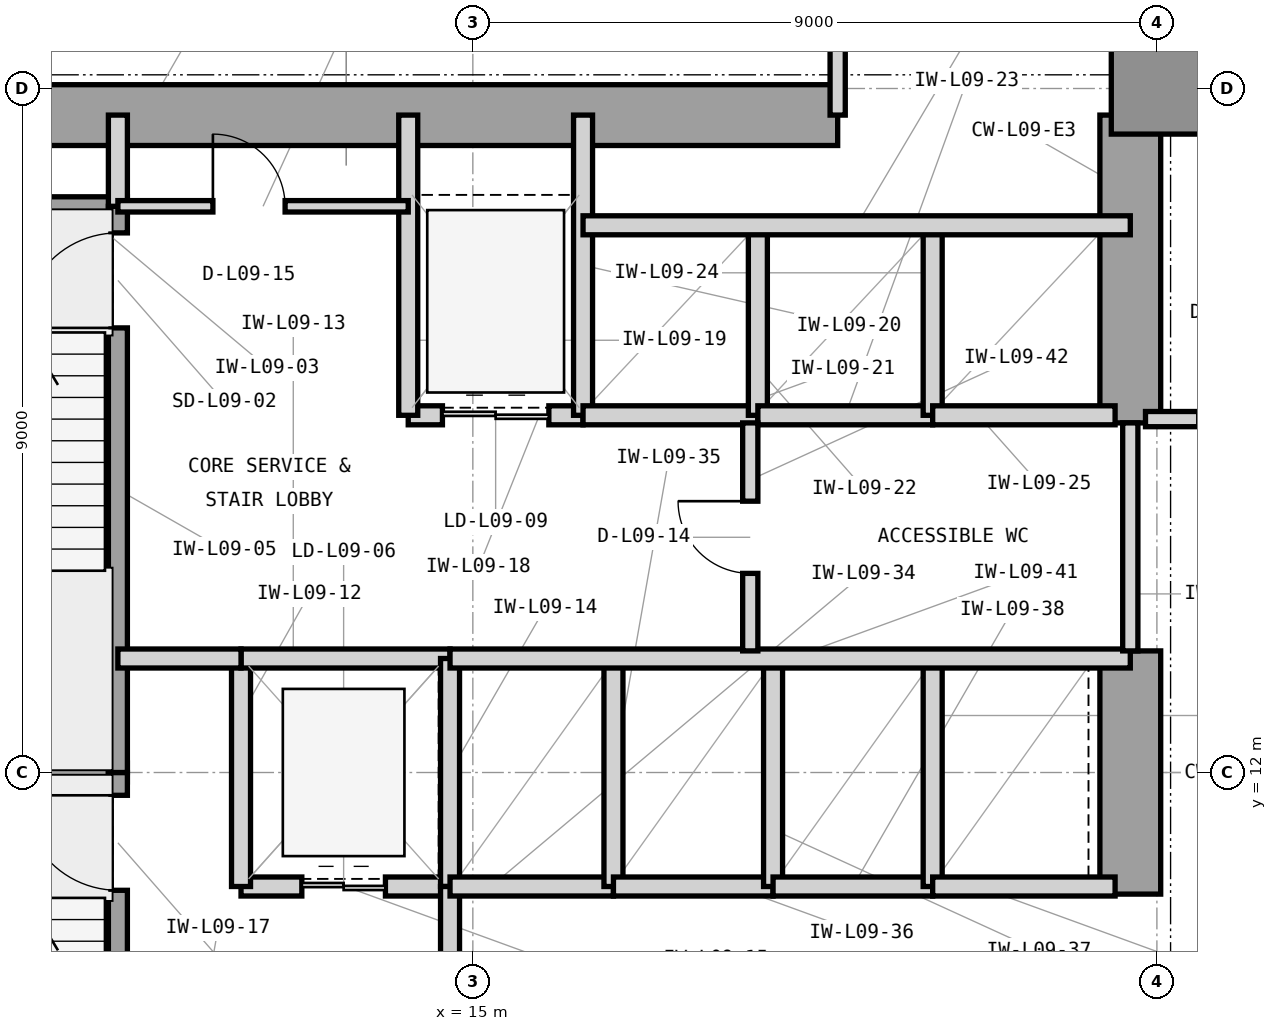
"""IFC4 building model, lengths in metres.
Left out: names, types, materials, properties, quantities, classifications, styles, units other than length and angle.
Written with IfcOpenShell. Run it as: python <this file> out.ifc"""

import sys

from ifc_helpers import new_model, si_unit, direction, frame, frame_2d, origin, origin_2d, place, context, subcontext, project, spatial, rectangle, extrude, element, fill, save


model = new_model("IFC4")
c1 = context("Model", 3, precision=1e-05, world=origin(), true_north=direction((0.0, 1.0)))
c2 = subcontext(c1, "Body", "Model", "MODEL_VIEW")
j1 = project(units=[si_unit("LENGTHUNIT", "METRE"), si_unit("PLANEANGLEUNIT", "RADIAN")], contexts=[c1])
p1 = place(None, origin())
s1 = spatial("IfcSite", under=j1, at=p1, CompositionType="ELEMENT")
p2 = place(p1, origin())
s2 = spatial("IfcBuilding", under=s1, at=p2, CompositionType="ELEMENT")
p3 = place(p2, frame((0.0, 0.0, 42.6)))
s3 = spatial("IfcBuildingStorey", under=s2, at=p3, CompositionType="ELEMENT", Elevation=42.6)
p4 = place(p3, frame((7.475, 20.65, 0.0), z_axis=(0.0, 0.0, 1.0), x_axis=(1.0, 0.0, 0.0)))
e1 = element("IfcWall", 1, at=p4, inside=s3, PredefinedType="SHEAR", context=c2, shape_type="SweptSolid", body=[
    extrude(rectangle(XDim=12.325, YDim=0.8, at=frame_2d((6.163, 0.0))), origin(), (0.0, 0.0, 1.0), 4.2),
])
p5 = place(p3, frame((23.65, 10.4, 0.0), z_axis=(0.0, 0.0, 1.0), x_axis=(0.0, 1.0, 0.0)))
e2 = element("IfcWall", 2, at=p5, inside=s3, PredefinedType="SHEAR", context=c2, shape_type="SweptSolid", body=[
    extrude(rectangle(XDim=3.2, YDim=0.8, at=frame_2d((1.6, 0.0))), origin(), (0.0, 0.0, 1.0), 4.2),
])
p6 = place(p3, frame((23.65, 16.6, 0.0), z_axis=(0.0, 0.0, 1.0), x_axis=(0.0, 1.0, 0.0)))
e3 = element("IfcWall", 3, at=p6, inside=s3, PredefinedType="SHEAR", context=c2, shape_type="SweptSolid", body=[
    extrude(rectangle(XDim=4.05, YDim=0.8, at=frame_2d((2.025, 0.0))), origin(), (0.0, 0.0, 1.0), 4.2),
])
p7 = place(p3, frame((24.0, 21.0, 0.0), z_axis=(0.0, 0.0, 1.0), x_axis=(1.0, 0.0, 0.0)))
e4 = element("IfcColumn", 4, at=p7, inside=s3, PredefinedType="COLUMN", context=c2, shape_type="SweptSolid", body=[
    extrude(rectangle(XDim=1.2, YDim=1.2, at=origin_2d()), origin(), (0.0, 0.0, 1.0), 4.2),
])
p8 = place(p3, frame((64.4, 20.79, 0.0), z_axis=(0.0, 0.0, 1.0), x_axis=(-1.0, 0.0, 0.0)))
e5 = element("IfcWall", 5, at=p8, inside=s3, PredefinedType="STANDARD", context=c2, shape_type="SweptSolid", body=[
    extrude(rectangle(XDim=40.4, YDim=0.42, at=frame_2d((20.2, 0.0))), origin(), (0.0, 0.0, 1.0), 3.98),
])
p9 = place(p8, frame((26.375, 0.0, 0.85)))
e6 = element("IfcOpeningElement", 6, at=p9, cuts=e5, PredefinedType="OPENING", context=c2, shape_type="SweptSolid", body=[
    extrude(rectangle(XDim=2.8, YDim=2.45, at=frame_2d((1.4, 1.225))), frame((0.0, 0.22, 0.0), z_axis=(0.0, -1.0, 0.0), x_axis=(1.0, 0.0, 0.0)), (0.0, 0.0, 1.0), 0.44),
])
p10 = place(p8, frame((38.222, 0.0, 0.85)))
e7 = element("IfcOpeningElement", 7, at=p10, cuts=e5, PredefinedType="OPENING", context=c2, shape_type="SweptSolid", body=[
    extrude(rectangle(XDim=1.2, YDim=2.45, at=frame_2d((0.6, 1.225))), frame((0.0, 0.22, 0.0), z_axis=(0.0, -1.0, 0.0), x_axis=(1.0, 0.0, 0.0)), (0.0, 0.0, 1.0), 0.44),
])
p11 = place(p8, frame((32.536, 0.0, 0.85)))
e8 = element("IfcOpeningElement", 8, at=p11, cuts=e5, PredefinedType="OPENING", context=c2, shape_type="SweptSolid", body=[
    extrude(rectangle(XDim=2.8, YDim=2.45, at=frame_2d((1.4, 1.225))), frame((0.0, 0.22, 0.0), z_axis=(0.0, -1.0, 0.0), x_axis=(1.0, 0.0, 0.0)), (0.0, 0.0, 1.0), 0.44),
])
p12 = place(p8, frame((17.386, 0.0, 0.85)))
e9 = element("IfcOpeningElement", 9, at=p12, cuts=e5, PredefinedType="OPENING", context=c2, shape_type="SweptSolid", body=[
    extrude(rectangle(XDim=2.8, YDim=2.45, at=frame_2d((1.4, 1.225))), frame((0.0, 0.22, 0.0), z_axis=(0.0, -1.0, 0.0), x_axis=(1.0, 0.0, 0.0)), (0.0, 0.0, 1.0), 0.44),
])
p13 = place(p3, frame((23.79, 21.0, 0.0), z_axis=(0.0, 0.0, 1.0), x_axis=(0.0, 1.0, 0.0)))
e10 = element("IfcWall", 10, at=p13, inside=s3, PredefinedType="STANDARD", context=c2, shape_type="SweptSolid", body=[
    extrude(rectangle(XDim=28.4, YDim=0.42, at=frame_2d((14.2, 0.0))), origin(), (0.0, 0.0, 1.0), 3.98),
])
p14 = place(p13, frame((10.433, 0.0, 0.85)))
e11 = element("IfcOpeningElement", 11, at=p14, cuts=e10, PredefinedType="OPENING", context=c2, shape_type="SweptSolid", body=[
    extrude(rectangle(XDim=2.8, YDim=2.45, at=frame_2d((1.4, 1.225))), frame((0.0, 0.22, 0.0), z_axis=(0.0, -1.0, 0.0), x_axis=(1.0, 0.0, 0.0)), (0.0, 0.0, 1.0), 0.44),
])
p15 = place(p13, frame((16.016, 0.0, 0.85)))
e12 = element("IfcOpeningElement", 12, at=p15, cuts=e10, PredefinedType="OPENING", context=c2, shape_type="SweptSolid", body=[
    extrude(rectangle(XDim=1.2, YDim=2.45, at=frame_2d((0.6, 1.225))), frame((0.0, 0.22, 0.0), z_axis=(0.0, -1.0, 0.0), x_axis=(1.0, 0.0, 0.0)), (0.0, 0.0, 1.0), 0.44),
])
p16 = place(p3, frame((6.35, 12.0, 0.0), z_axis=(0.0, 0.0, 1.0), x_axis=(1.0, 0.0, 0.0)))
e13 = element("IfcWall", 13, at=p16, inside=s3, PredefinedType="SHEAR", context=c2, shape_type="SweptSolid", body=[
    extrude(rectangle(XDim=4.105, YDim=0.25, at=frame_2d((2.052, 0.0))), origin(), (0.0, 0.0, 1.0), 4.2),
])
p17 = place(p3, frame((7.7, 19.45, 0.0), z_axis=(0.0, 0.0, 1.0), x_axis=(1.0, 0.0, 0.0)))
e14 = element("IfcWall", 14, at=p17, inside=s3, PredefinedType="SHEAR", context=c2, shape_type="SweptSolid", body=[
    extrude(rectangle(XDim=2.755, YDim=0.25, at=frame_2d((1.377, 0.0))), origin(), (0.0, 0.0, 1.0), 4.2),
])
p18 = place(p3, frame((10.33, 4.55, 0.0), z_axis=(0.0, 0.0, 1.0), x_axis=(0.0, 1.0, 0.0)))
e15 = element("IfcWall", 15, at=p18, inside=s3, PredefinedType="SHEAR", context=c2, shape_type="SweptSolid", body=[
    extrude(rectangle(XDim=7.45, YDim=0.25, at=frame_2d((3.725, 0.0))), origin(), (0.0, 0.0, 1.0), 4.2),
])
p19 = place(p18, frame((5.9, 0.0, 0.0)))
e16 = element("IfcOpeningElement", 16, at=p19, cuts=e15, PredefinedType="OPENING", context=c2, shape_type="SweptSolid", body=[
    extrude(rectangle(XDim=1.25, YDim=2.2, at=frame_2d((0.625, 1.1))), frame((0.0, 0.135, 0.0), z_axis=(0.0, -1.0, 0.0), x_axis=(1.0, 0.0, 0.0)), (0.0, 0.0, 1.0), 0.27),
])
p20 = place(p3, frame((10.33, 12.0, 0.0), z_axis=(0.0, 0.0, 1.0), x_axis=(0.0, 1.0, 0.0)))
e17 = element("IfcWall", 17, at=p20, inside=s3, PredefinedType="SHEAR", context=c2, shape_type="SweptSolid", body=[
    extrude(rectangle(XDim=7.45, YDim=0.25, at=frame_2d((3.725, 0.0))), origin(), (0.0, 0.0, 1.0), 4.2),
])
p21 = place(p20, frame((5.85, 0.0, 0.0)))
e18 = element("IfcOpeningElement", 18, at=p21, cuts=e17, PredefinedType="OPENING", context=c2, shape_type="SweptSolid", body=[
    extrude(rectangle(XDim=1.25, YDim=2.2, at=frame_2d((0.625, 1.1))), frame((0.0, 0.135, 0.0), z_axis=(0.0, -1.0, 0.0), x_axis=(1.0, 0.0, 0.0)), (0.0, 0.0, 1.0), 0.27),
])
p22 = place(p3, frame((10.33, 19.45, 0.0), z_axis=(0.0, 0.0, 1.0), x_axis=(0.0, 1.0, 0.0)))
e19 = element("IfcWall", 19, at=p22, inside=s3, PredefinedType="PARTITIONING", context=c2, shape_type="SweptSolid", body=[
    extrude(rectangle(XDim=1.2, YDim=0.25, at=frame_2d((0.6, 0.0))), origin(), (0.0, 0.0, 1.0), 3.114),
])
p23 = place(p3, frame((11.95, 10.5, 0.0), z_axis=(0.0, 0.0, 1.0), x_axis=(1.0, 0.0, 0.0)))
e20 = element("IfcWall", 20, at=p23, inside=s3, PredefinedType="PARTITIONING", context=c2, shape_type="SweptSolid", body=[
    extrude(rectangle(XDim=2.75, YDim=0.25, at=frame_2d((1.375, 0.0))), origin(), (0.0, 0.0, 1.0), 3.426),
])
p24 = place(p23, frame((0.8, 0.0, 0.0)))
e21 = element("IfcOpeningElement", 21, at=p24, cuts=e20, PredefinedType="OPENING", context=c2, shape_type="SweptSolid", body=[
    extrude(rectangle(XDim=1.1, YDim=2.25, at=frame_2d((0.55, 1.125))), frame((0.0, 0.135, 0.0), z_axis=(0.0, -1.0, 0.0), x_axis=(1.0, 0.0, 0.0)), (0.0, 0.0, 1.0), 0.27),
])
p25 = place(p3, frame((11.95, 10.5, 0.0), z_axis=(0.0, 0.0, 1.0), x_axis=(0.0, 1.0, 0.0)))
e22 = element("IfcWall", 22, at=p25, inside=s3, PredefinedType="PARTITIONING", context=c2, shape_type="SweptSolid", body=[
    extrude(rectangle(XDim=3.0, YDim=0.25, at=frame_2d((1.5, 0.0))), origin(), (0.0, 0.0, 1.0), 3.97),
])
p26 = place(p3, frame((11.95, 13.5, 0.0), z_axis=(0.0, 0.0, 1.0), x_axis=(1.0, 0.0, 0.0)))
e23 = element("IfcWall", 23, at=p26, inside=s3, PredefinedType="PARTITIONING", context=c2, shape_type="SweptSolid", body=[
    extrude(rectangle(XDim=2.75, YDim=0.25, at=frame_2d((1.375, 0.0))), origin(), (0.0, 0.0, 1.0), 3.426),
])
p27 = place(p3, frame((14.7, 10.5, 0.0), z_axis=(0.0, 0.0, 1.0), x_axis=(0.0, 1.0, 0.0)))
e24 = element("IfcWall", 24, at=p27, inside=s3, PredefinedType="PARTITIONING", context=c2, shape_type="SweptSolid", body=[
    extrude(rectangle(XDim=3.0, YDim=0.25, at=frame_2d((1.5, 0.0))), origin(), (0.0, 0.0, 1.0), 3.97),
])
p28 = place(p3, frame((14.7, 6.7, 0.0), z_axis=(0.0, 0.0, 1.0), x_axis=(0.0, 1.0, 0.0)))
e25 = element("IfcWall", 25, at=p28, inside=s3, PredefinedType="PARTITIONING", context=c2, shape_type="SweptSolid", body=[
    extrude(rectangle(XDim=3.8, YDim=0.25, at=frame_2d((1.9, 0.0))), origin(), (0.0, 0.0, 1.0), 3.97),
])
p29 = place(p28, frame((1.3, 0.0, 0.0)))
e26 = element("IfcOpeningElement", 26, at=p29, cuts=e25, PredefinedType="OPENING", context=c2, shape_type="SweptSolid", body=[
    extrude(rectangle(XDim=1.2, YDim=2.2, at=frame_2d((0.6, 1.1))), frame((0.0, 0.135, 0.0), z_axis=(0.0, -1.0, 0.0), x_axis=(1.0, 0.0, 0.0)), (0.0, 0.0, 1.0), 0.27),
])
p30 = place(p3, frame((10.33, 13.5, 0.0), z_axis=(0.0, 0.0, 1.0), x_axis=(1.0, 0.0, 0.0)))
e27 = element("IfcWall", 27, at=p30, inside=s3, PredefinedType="PARTITIONING", context=c2, shape_type="SweptSolid", body=[
    extrude(rectangle(XDim=1.62, YDim=0.25, at=frame_2d((0.81, 0.0))), origin(), (0.0, 0.0, 1.0), 3.426),
])
p31 = place(p3, frame((14.15, 16.7, 0.0), z_axis=(0.0, 0.0, 1.0), x_axis=(1.0, 0.0, 0.0)))
e28 = element("IfcWall", 28, at=p31, inside=s3, PredefinedType="PARTITIONING", context=c2, shape_type="SweptSolid", body=[
    extrude(rectangle(XDim=2.3, YDim=0.25, at=frame_2d((1.15, 0.0))), origin(), (0.0, 0.0, 1.0), 3.426),
])
p32 = place(p31, frame((0.45, 0.0, 0.0)))
e29 = element("IfcOpeningElement", 29, at=p32, cuts=e28, PredefinedType="OPENING", context=c2, shape_type="SweptSolid", body=[
    extrude(rectangle(XDim=1.4, YDim=2.35, at=frame_2d((0.7, 1.175))), frame((0.0, 0.135, 0.0), z_axis=(0.0, -1.0, 0.0), x_axis=(1.0, 0.0, 0.0)), (0.0, 0.0, 1.0), 0.27),
])
for number, where, z_axis, x_axis in (
    (30, (14.15, 16.7, 0.0), (0.0, 0.0, 1.0), (0.0, 1.0, 0.0)),
    (31, (16.45, 16.7, 0.0), (0.0, 0.0, 1.0), (0.0, 1.0, 0.0)),
):
    element("IfcWall", number, at=place(p3, frame(where, z_axis=z_axis, x_axis=x_axis)), inside=s3, PredefinedType="PARTITIONING", context=c2, shape_type="SweptSolid", body=[
        extrude(rectangle(XDim=3.95, YDim=0.25, at=frame_2d((1.975, 0.0))), origin(), (0.0, 0.0, 1.0), 3.97),
    ])
p33 = place(p3, frame((16.45, 16.7, 0.0), z_axis=(0.0, 0.0, 1.0), x_axis=(1.0, 0.0, 0.0)))
e32 = element("IfcWall", 32, at=p33, inside=s3, PredefinedType="PARTITIONING", context=c2, shape_type="SweptSolid", body=[
    extrude(rectangle(XDim=2.3, YDim=0.25, at=frame_2d((1.15, 0.0))), origin(), (0.0, 0.0, 1.0), 3.426),
])
p34 = place(p3, frame((18.75, 16.7, 0.0), z_axis=(0.0, 0.0, 1.0), x_axis=(0.0, 1.0, 0.0)))
e33 = element("IfcWall", 33, at=p34, inside=s3, PredefinedType="PARTITIONING", context=c2, shape_type="SweptSolid", body=[
    extrude(rectangle(XDim=2.5, YDim=0.25, at=frame_2d((1.25, 0.0))), origin(), (0.0, 0.0, 1.0), 3.97),
])
p35 = place(p3, frame((18.75, 16.7, 0.0), z_axis=(0.0, 0.0, 1.0), x_axis=(1.0, 0.0, 0.0)))
e34 = element("IfcWall", 34, at=p35, inside=s3, PredefinedType="PARTITIONING", context=c2, shape_type="SweptSolid", body=[
    extrude(rectangle(XDim=2.3, YDim=0.25, at=frame_2d((1.15, 0.0))), origin(), (0.0, 0.0, 1.0), 3.426),
])
p36 = place(p3, frame((21.05, 16.7, 0.0), z_axis=(0.0, 0.0, 1.0), x_axis=(0.0, 1.0, 0.0)))
e35 = element("IfcWall", 35, at=p36, inside=s3, PredefinedType="PARTITIONING", context=c2, shape_type="SweptSolid", body=[
    extrude(rectangle(XDim=2.5, YDim=0.25, at=frame_2d((1.25, 0.0))), origin(), (0.0, 0.0, 1.0), 3.97),
])
p37 = place(p3, frame((21.05, 16.7, 0.0), z_axis=(0.0, 0.0, 1.0), x_axis=(1.0, 0.0, 0.0)))
e36 = element("IfcWall", 36, at=p37, inside=s3, PredefinedType="PARTITIONING", context=c2, shape_type="SweptSolid", body=[
    extrude(rectangle(XDim=2.4, YDim=0.25, at=frame_2d((1.2, 0.0))), origin(), (0.0, 0.0, 1.0), 3.426),
])
p38 = place(p3, frame((16.45, 19.2, 0.0), z_axis=(0.0, 0.0, 1.0), x_axis=(1.0, 0.0, 0.0)))
e37 = element("IfcWall", 37, at=p38, inside=s3, PredefinedType="PARTITIONING", context=c2, shape_type="SweptSolid", body=[
    extrude(rectangle(XDim=7.2, YDim=0.25, at=frame_2d((3.6, 0.0))), origin(), (0.0, 0.0, 1.0), 3.97),
])
p39 = place(p3, frame((14.7, 10.5, 0.0), z_axis=(0.0, 0.0, 1.0), x_axis=(1.0, 0.0, 0.0)))
e38 = element("IfcWall", 38, at=p39, inside=s3, PredefinedType="PARTITIONING", context=c2, shape_type="SweptSolid", body=[
    extrude(rectangle(XDim=2.15, YDim=0.25, at=frame_2d((1.075, 0.0))), origin(), (0.0, 0.0, 1.0), 3.426),
])
p40 = place(p3, frame((16.85, 10.5, 0.0), z_axis=(0.0, 0.0, 1.0), x_axis=(0.0, 1.0, 0.0)))
e39 = element("IfcWall", 39, at=p40, inside=s3, PredefinedType="PARTITIONING", context=c2, shape_type="SweptSolid", body=[
    extrude(rectangle(XDim=3.0, YDim=0.25, at=frame_2d((1.5, 0.0))), origin(), (0.0, 0.0, 1.0), 3.97),
])
p41 = place(p3, frame((16.85, 10.5, 0.0), z_axis=(0.0, 0.0, 1.0), x_axis=(1.0, 0.0, 0.0)))
e40 = element("IfcWall", 40, at=p41, inside=s3, PredefinedType="PARTITIONING", context=c2, shape_type="SweptSolid", body=[
    extrude(rectangle(XDim=2.1, YDim=0.25, at=frame_2d((1.05, 0.0))), origin(), (0.0, 0.0, 1.0), 3.426),
])
p42 = place(p3, frame((18.95, 10.5, 0.0), z_axis=(0.0, 0.0, 1.0), x_axis=(0.0, 1.0, 0.0)))
e41 = element("IfcWall", 41, at=p42, inside=s3, PredefinedType="PARTITIONING", context=c2, shape_type="SweptSolid", body=[
    extrude(rectangle(XDim=3.0, YDim=0.25, at=frame_2d((1.5, 0.0))), origin(), (0.0, 0.0, 1.0), 3.97),
])
p43 = place(p3, frame((18.95, 10.5, 0.0), z_axis=(0.0, 0.0, 1.0), x_axis=(1.0, 0.0, 0.0)))
e42 = element("IfcWall", 42, at=p43, inside=s3, PredefinedType="PARTITIONING", context=c2, shape_type="SweptSolid", body=[
    extrude(rectangle(XDim=2.1, YDim=0.25, at=frame_2d((1.05, 0.0))), origin(), (0.0, 0.0, 1.0), 3.426),
])
p44 = place(p3, frame((21.05, 10.5, 0.0), z_axis=(0.0, 0.0, 1.0), x_axis=(0.0, 1.0, 0.0)))
e43 = element("IfcWall", 43, at=p44, inside=s3, PredefinedType="PARTITIONING", context=c2, shape_type="SweptSolid", body=[
    extrude(rectangle(XDim=3.0, YDim=0.25, at=frame_2d((1.5, 0.0))), origin(), (0.0, 0.0, 1.0), 3.97),
])
p45 = place(p3, frame((21.05, 10.5, 0.0), z_axis=(0.0, 0.0, 1.0), x_axis=(1.0, 0.0, 0.0)))
e44 = element("IfcWall", 44, at=p45, inside=s3, PredefinedType="PARTITIONING", context=c2, shape_type="SweptSolid", body=[
    extrude(rectangle(XDim=2.4, YDim=0.25, at=frame_2d((1.2, 0.0))), origin(), (0.0, 0.0, 1.0), 3.426),
])
p46 = place(p3, frame((14.7, 13.5, 0.0), z_axis=(0.0, 0.0, 1.0), x_axis=(1.0, 0.0, 0.0)))
e45 = element("IfcWall", 45, at=p46, inside=s3, PredefinedType="PARTITIONING", context=c2, shape_type="SweptSolid", body=[
    extrude(rectangle(XDim=8.95, YDim=0.25, at=frame_2d((4.475, 0.0))), origin(), (0.0, 0.0, 1.0), 3.426),
])
p47 = place(p3, frame((18.65, 13.6, 0.0), z_axis=(0.0, 0.0, 1.0), x_axis=(0.0, 1.0, 0.0)))
e46 = element("IfcWall", 46, at=p47, inside=s3, PredefinedType="PARTITIONING", context=c2, shape_type="SweptSolid", body=[
    extrude(rectangle(XDim=3.0, YDim=0.2, at=frame_2d((1.5, 0.0))), origin(), (0.0, 0.0, 1.0), 3.97),
])
p48 = place(p47, frame((1.02, 0.0, 0.0)))
e47 = element("IfcOpeningElement", 47, at=p48, cuts=e46, PredefinedType="OPENING", context=c2, shape_type="SweptSolid", body=[
    extrude(rectangle(XDim=0.95, YDim=2.1, at=frame_2d((0.475, 1.05))), frame((0.0, 0.11, 0.0), z_axis=(0.0, -1.0, 0.0), x_axis=(1.0, 0.0, 0.0)), (0.0, 0.0, 1.0), 0.22),
])
p49 = place(p3, frame((23.65, 13.6, 0.0), z_axis=(0.0, 0.0, 1.0), x_axis=(0.0, 1.0, 0.0)))
e48 = element("IfcWall", 48, at=p49, inside=s3, PredefinedType="PARTITIONING", context=c2, shape_type="SweptSolid", body=[
    extrude(rectangle(XDim=3.0, YDim=0.2, at=frame_2d((1.5, 0.0))), origin(), (0.0, 0.0, 1.0), 3.97),
])
p50 = place(p3, frame((10.33, 19.45, 0.0), z_axis=(0.0, 0.0, 1.0), x_axis=(1.0, 0.0, 0.0)))
e49 = element("IfcWall", 49, at=p50, inside=s3, PredefinedType="PARTITIONING", context=c2, shape_type="SweptSolid", body=[
    extrude(rectangle(XDim=3.82, YDim=0.15, at=frame_2d((1.91, 0.0))), origin(), (0.0, 0.0, 1.0), 3.97),
])
p51 = place(p50, frame((1.25, 0.0, 0.0)))
e50 = element("IfcOpeningElement", 50, at=p51, cuts=e49, PredefinedType="OPENING", context=c2, shape_type="SweptSolid", body=[
    extrude(rectangle(XDim=0.95, YDim=2.1, at=frame_2d((0.475, 1.05))), frame((0.0, 0.085, 0.0), z_axis=(0.0, -1.0, 0.0), x_axis=(1.0, 0.0, 0.0)), (0.0, 0.0, 1.0), 0.17),
])
p52 = place(p3, frame((23.85, 16.65, 0.0), z_axis=(0.0, 0.0, 1.0), x_axis=(1.0, 0.0, 0.0)))
e51 = element("IfcWall", 51, at=p52, inside=s3, PredefinedType="PARTITIONING", context=c2, shape_type="SweptSolid", body=[
    extrude(rectangle(XDim=2.85, YDim=0.2, at=frame_2d((1.425, 0.0))), origin(), (0.0, 0.0, 1.0), 3.97),
])
p53 = place(p52, frame((0.7, 0.0, 0.0)))
e52 = element("IfcOpeningElement", 52, at=p53, cuts=e51, PredefinedType="OPENING", context=c2, shape_type="SweptSolid", body=[
    extrude(rectangle(XDim=1.0, YDim=2.15, at=frame_2d((0.5, 1.075))), frame((0.0, 0.11, 0.0), z_axis=(0.0, -1.0, 0.0), x_axis=(1.0, 0.0, 0.0)), (0.0, 0.0, 1.0), 0.22),
])
p54 = place(p3, frame((19.8, 20.65, 0.0), z_axis=(0.0, 0.0, 1.0), x_axis=(0.0, 1.0, 0.0)))
e53 = element("IfcWall", 53, at=p54, inside=s3, PredefinedType="PARTITIONING", context=c2, shape_type="SweptSolid", body=[
    extrude(rectangle(XDim=6.15, YDim=0.2, at=frame_2d((3.075, 0.0))), origin(), (0.0, 0.0, 1.0), 3.97),
])
p55 = place(p19, origin())
e54 = element("IfcDoor", 54, at=p55, inside=s3, OperationType="SINGLE_SWING_RIGHT", PredefinedType="DOOR", context=c2, shape_type="SweptSolid", body=[
    extrude(rectangle(XDim=1.25, YDim=2.2, at=frame_2d((0.625, 1.1))), frame((0.0, 0.025, 0.0), z_axis=(0.0, -1.0, 0.0), x_axis=(1.0, 0.0, 0.0)), (0.0, 0.0, 1.0), 0.05),
])
fill(e16, e54)
p56 = place(p21, origin())
e55 = element("IfcDoor", 55, at=p56, inside=s3, OperationType="SINGLE_SWING_LEFT", PredefinedType="DOOR", context=c2, shape_type="SweptSolid", body=[
    extrude(rectangle(XDim=1.25, YDim=2.2, at=frame_2d((0.625, 1.1))), frame((0.0, 0.025, 0.0), z_axis=(0.0, -1.0, 0.0), x_axis=(1.0, 0.0, 0.0)), (0.0, 0.0, 1.0), 0.05),
])
fill(e18, e55)
p57 = place(p24, origin())
e56 = element("IfcDoor", 56, at=p57, inside=s3, OperationType="DOUBLE_DOOR_SLIDING", PredefinedType="DOOR", context=c2, shape_type="SweptSolid", body=[
    extrude(rectangle(XDim=1.1, YDim=2.25, at=frame_2d((0.55, 1.125))), frame((0.0, 0.025, 0.0), z_axis=(0.0, -1.0, 0.0), x_axis=(1.0, 0.0, 0.0)), (0.0, 0.0, 1.0), 0.05),
])
fill(e21, e56)
p58 = place(p32, origin())
e57 = element("IfcDoor", 57, at=p58, inside=s3, OperationType="DOUBLE_DOOR_SLIDING", PredefinedType="DOOR", context=c2, shape_type="SweptSolid", body=[
    extrude(rectangle(XDim=1.4, YDim=2.35, at=frame_2d((0.7, 1.175))), frame((0.0, 0.025, 0.0), z_axis=(0.0, -1.0, 0.0), x_axis=(1.0, 0.0, 0.0)), (0.0, 0.0, 1.0), 0.05),
])
fill(e29, e57)
p59 = place(p48, origin())
e58 = element("IfcDoor", 58, at=p59, inside=s3, OperationType="SINGLE_SWING_RIGHT", PredefinedType="DOOR", context=c2, shape_type="SweptSolid", body=[
    extrude(rectangle(XDim=0.95, YDim=2.1, at=frame_2d((0.475, 1.05))), frame((0.0, 0.025, 0.0), z_axis=(0.0, -1.0, 0.0), x_axis=(1.0, 0.0, 0.0)), (0.0, 0.0, 1.0), 0.05),
])
fill(e47, e58)
p60 = place(p51, origin())
e59 = element("IfcDoor", 59, at=p60, inside=s3, OperationType="SINGLE_SWING_LEFT", PredefinedType="DOOR", context=c2, shape_type="SweptSolid", body=[
    extrude(rectangle(XDim=0.95, YDim=2.1, at=frame_2d((0.475, 1.05))), frame((0.0, 0.025, 0.0), z_axis=(0.0, -1.0, 0.0), x_axis=(1.0, 0.0, 0.0)), (0.0, 0.0, 1.0), 0.05),
])
fill(e50, e59)
save(model, sys.argv[1])
